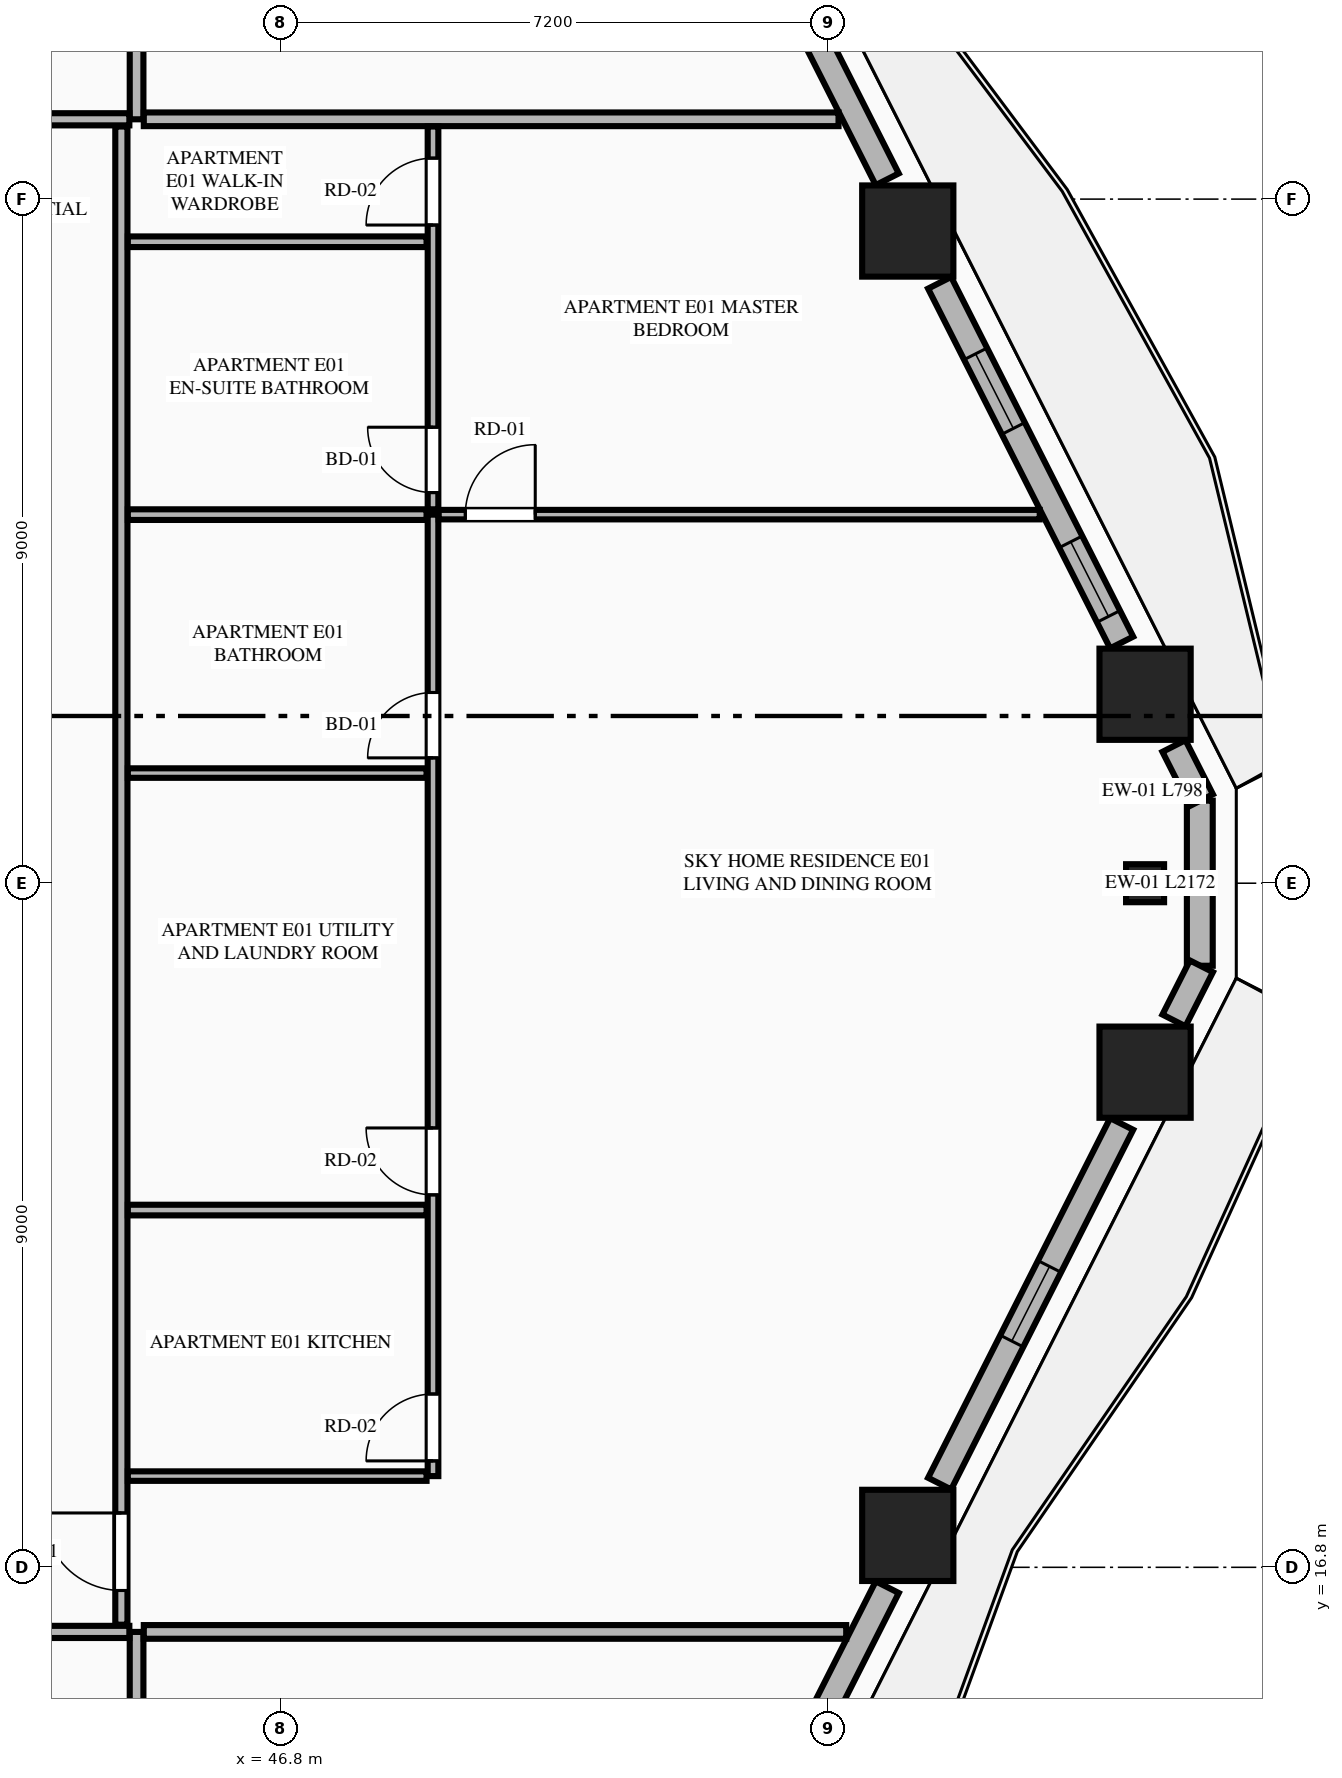
"""IFC4 building model, lengths in metres.
Left out: names, types, materials, properties, quantities, classifications, styles, units other than length and angle.
Written with IfcOpenShell. Run it as: python <this file> out.ifc"""

import sys

from ifc_helpers import new_model, si_unit, direction, frame, frame_2d, origin, origin_2d, place, context, subcontext, project, spatial, rectangle, extrude, element, fill, save


model = new_model("IFC4")
c1 = context("Model", 3, precision=1e-05, world=origin(), true_north=direction((0.0, 1.0)))
c2 = subcontext(c1, "Body", "Model", "MODEL_VIEW")
j1 = project(units=[si_unit("LENGTHUNIT", "METRE"), si_unit("PLANEANGLEUNIT", "RADIAN")], contexts=[c1])
p1 = place(None, origin())
s1 = spatial("IfcSite", under=j1, at=p1, CompositionType="ELEMENT")
p2 = place(p1, origin())
s2 = spatial("IfcBuilding", under=s1, at=p2, CompositionType="ELEMENT")
p3 = place(p2, frame((0.0, 0.0, 56.85)))
s3 = spatial("IfcBuildingStorey", under=s2, at=p3, CompositionType="ELEMENT", Elevation=56.85)
for number, where, z_axis, x_axis in (
    (1, (55.046, 17.22, 0.0), (0.0, 0.0, 1.0), (1.0, 0.0, 0.0)),
    (2, (58.168, 23.314, 0.0), (0.0, 0.0, 1.0), (1.0, 0.0, 0.0)),
    (3, (58.168, 28.286, 0.0), (0.0, 0.0, 1.0), (1.0, 0.0, 0.0)),
    (4, (55.046, 34.38, 0.0), (0.0, 0.0, 1.0), (1.0, 0.0, 0.0)),
):
    element("IfcColumn", number, at=place(p3, frame(where, z_axis=z_axis, x_axis=x_axis)), inside=s3, PredefinedType="COLUMN", context=c2, shape_type="SweptSolid", body=[
        extrude(rectangle(XDim=1.2, YDim=1.2, at=origin_2d()), origin(), (0.0, 0.0, 1.0), 3.55),
    ])
p4 = place(p3, frame((58.168, 25.8, 0.0), z_axis=(0.0, 0.0, 1.0), x_axis=(0.0, 1.0, 0.0)))
e5 = element("IfcColumn", 5, at=p4, inside=s3, PredefinedType="PILASTER", context=c2, shape_type="SweptSolid", body=[
    extrude(rectangle(XDim=0.5, YDim=0.35, at=origin_2d()), origin(), (0.0, 0.0, 1.0), 3.55),
])
p5 = place(p3, frame((58.888, 24.714, 0.0), z_axis=(0.0, 0.0, 1.0), x_axis=(0.0, 1.0, 0.0)))
e6 = element("IfcWall", 6, at=p5, inside=s3, PredefinedType="STANDARD", context=c2, shape_type="SweptSolid", body=[
    extrude(rectangle(XDim=2.172, YDim=0.34, at=frame_2d((1.086, 0.0))), origin(), (0.0, 0.0, 1.0), 3.33),
])
p6 = place(p3, frame((52.271, 11.59, 0.0), z_axis=(0.0, 0.0, 1.0), x_axis=(0.451592100298, 0.892224509273, 0.0)))
e7 = element("IfcWall", 7, at=p6, inside=s3, PredefinedType="STANDARD", context=c2, shape_type="SweptSolid", body=[
    extrude(rectangle(XDim=5.547, YDim=0.34, at=frame_2d((2.773, 0.0))), origin(), (0.0, 0.0, 1.0), 2.787),
])
p7 = place(p6, frame((1.768, 0.0, 0.0)))
e8 = element("IfcOpeningElement", 8, at=p7, cuts=e7, PredefinedType="OPENING", context=c2, shape_type="SweptSolid", body=[
    extrude(rectangle(XDim=1.1, YDim=2.25, at=frame_2d((0.55, 1.125))), frame((0.0, 0.18, 0.0), z_axis=(0.0, -1.0, 0.0), x_axis=(1.0, 0.0, 0.0)), (0.0, 0.0, 1.0), 0.36),
])
p8 = place(p3, frame((55.465, 17.901, 0.0), z_axis=(0.0, 0.0, 1.0), x_axis=(0.451572088722, 0.892234637686, 0.0)))
e9 = element("IfcWall", 9, at=p8, inside=s3, PredefinedType="STANDARD", context=c2, shape_type="SweptSolid", body=[
    extrude(rectangle(XDim=5.304, YDim=0.34, at=frame_2d((2.652, 0.0))), origin(), (0.0, 0.0, 1.0), 2.787),
])
p9 = place(p8, frame((2.102, 0.0, 0.75)))
e10 = element("IfcOpeningElement", 10, at=p9, cuts=e9, PredefinedType="OPENING", context=c2, shape_type="SweptSolid", body=[
    extrude(rectangle(XDim=1.1, YDim=1.887, at=frame_2d((0.55, 0.943))), frame((0.0, 0.18, 0.0), z_axis=(0.0, -1.0, 0.0), x_axis=(1.0, 0.0, 0.0)), (0.0, 0.0, 1.0), 0.36),
])
for number, where, z_axis, x_axis in (
    (11, (58.548, 23.995, 0.0), (0.0, 0.0, 1.0), (0.452, 0.892, 0.0)),
    (12, (58.909, 26.893, 0.0), (0.0, 0.0, 1.0), (-0.452, 0.892, 0.0)),
):
    element("IfcWall", number, at=place(p3, frame(where, z_axis=z_axis, x_axis=x_axis)), inside=s3, PredefinedType="STANDARD", context=c2, shape_type="SweptSolid", body=[
        extrude(rectangle(XDim=0.798, YDim=0.34, at=frame_2d((0.399, 0.0))), origin(), (0.0, 0.0, 1.0), 3.33),
    ])
p10 = place(p3, frame((57.86, 28.967, 0.0), z_axis=(0.0, 0.0, 1.0), x_axis=(-0.451590635984, 0.892225250422, 0.0)))
e13 = element("IfcWall", 13, at=p10, inside=s3, PredefinedType="STANDARD", context=c2, shape_type="SweptSolid", body=[
    extrude(rectangle(XDim=5.303, YDim=0.34, at=frame_2d((2.652, 0.0))), origin(), (0.0, 0.0, 1.0), 2.787),
])
p11 = place(p10, frame((0.384, 0.0, 0.75)))
e14 = element("IfcOpeningElement", 14, at=p11, cuts=e13, PredefinedType="OPENING", context=c2, shape_type="SweptSolid", body=[
    extrude(rectangle(XDim=1.1, YDim=1.887, at=frame_2d((0.55, 0.943))), frame((0.0, 0.18, 0.0), z_axis=(0.0, -1.0, 0.0), x_axis=(1.0, 0.0, 0.0)), (0.0, 0.0, 1.0), 0.36),
])
p12 = place(p10, frame((3.156, 0.0, 0.75)))
e15 = element("IfcOpeningElement", 15, at=p12, cuts=e13, PredefinedType="OPENING", context=c2, shape_type="SweptSolid", body=[
    extrude(rectangle(XDim=1.1, YDim=1.887, at=frame_2d((0.55, 0.943))), frame((0.0, 0.18, 0.0), z_axis=(0.0, -1.0, 0.0), x_axis=(1.0, 0.0, 0.0)), (0.0, 0.0, 1.0), 0.36),
])
p13 = place(p3, frame((54.776, 35.061, 0.0), z_axis=(0.0, 0.0, 1.0), x_axis=(-0.451592100298, 0.892224509273, 0.0)))
e16 = element("IfcWall", 16, at=p13, inside=s3, PredefinedType="STANDARD", context=c2, shape_type="SweptSolid", body=[
    extrude(rectangle(XDim=5.547, YDim=0.34, at=frame_2d((2.773, 0.0))), origin(), (0.0, 0.0, 1.0), 2.787),
])
p14 = place(p13, frame((2.791, 0.0, 0.0)))
e17 = element("IfcOpeningElement", 17, at=p14, cuts=e16, PredefinedType="OPENING", context=c2, shape_type="SweptSolid", body=[
    extrude(rectangle(XDim=1.1, YDim=2.25, at=frame_2d((0.55, 1.125))), frame((0.0, 0.18, 0.0), z_axis=(0.0, -1.0, 0.0), x_axis=(1.0, 0.0, 0.0)), (0.0, 0.0, 1.0), 0.36),
])
p15 = place(p3, frame((44.9, 2.455, 0.0), z_axis=(0.0, 0.0, 1.0), x_axis=(0.0, 1.0, 0.0)))
e18 = element("IfcWall", 18, at=p15, inside=s3, PredefinedType="PARTITIONING", context=c2, shape_type="SweptSolid", body=[
    extrude(rectangle(XDim=13.495, YDim=0.18, at=frame_2d((6.748, 0.0))), origin(), (0.0, 0.0, 1.0), 3.33),
])
p16 = place(p3, frame((36.617, 15.95, 0.0), z_axis=(0.0, 0.0, 1.0), x_axis=(1.0, 0.0, 0.0)))
e19 = element("IfcWall", 19, at=p16, inside=s3, PredefinedType="PARTITIONING", context=c2, shape_type="SweptSolid", body=[
    extrude(rectangle(XDim=8.188, YDim=0.16, at=frame_2d((4.094, 0.0))), origin(), (0.0, 0.0, 1.0), 3.33),
])
p17 = place(p16, frame((0.355, 0.0, 0.0)))
e20 = element("IfcOpeningElement", 20, at=p17, cuts=e19, PredefinedType="OPENING", context=c2, shape_type="SweptSolid", body=[
    extrude(rectangle(XDim=1.02, YDim=2.25, at=frame_2d((0.51, 1.125))), frame((0.0, 0.09, 0.0), z_axis=(0.0, -1.0, 0.0), x_axis=(1.0, 0.0, 0.0)), (0.0, 0.0, 1.0), 0.18),
])
p18 = place(p3, frame((44.9, 35.85, 0.0), z_axis=(0.0, 0.0, 1.0), x_axis=(0.0, 1.0, 0.0)))
e21 = element("IfcWall", 21, at=p18, inside=s3, PredefinedType="PARTITIONING", context=c2, shape_type="SweptSolid", body=[
    extrude(rectangle(XDim=13.295, YDim=0.18, at=frame_2d((6.647, 0.0))), origin(), (0.0, 0.0, 1.0), 3.33),
])
p19 = place(p3, frame((36.617, 35.85, 0.0), z_axis=(0.0, 0.0, 1.0), x_axis=(1.0, 0.0, 0.0)))
e22 = element("IfcWall", 22, at=p19, inside=s3, PredefinedType="PARTITIONING", context=c2, shape_type="SweptSolid", body=[
    extrude(rectangle(XDim=8.188, YDim=0.16, at=frame_2d((4.094, 0.0))), origin(), (0.0, 0.0, 1.0), 3.33),
])
p20 = place(p19, frame((0.355, 0.0, 0.0)))
e23 = element("IfcOpeningElement", 23, at=p20, cuts=e22, PredefinedType="OPENING", context=c2, shape_type="SweptSolid", body=[
    extrude(rectangle(XDim=1.02, YDim=2.25, at=frame_2d((0.51, 1.125))), frame((0.0, 0.09, 0.0), z_axis=(0.0, -1.0, 0.0), x_axis=(1.0, 0.0, 0.0)), (0.0, 0.0, 1.0), 0.18),
])
p21 = place(p3, frame((44.995, 15.95, 0.0), z_axis=(0.0, 0.0, 1.0), x_axis=(1.0, 0.0, 0.0)))
e24 = element("IfcWall", 24, at=p21, inside=s3, PredefinedType="PARTITIONING", context=c2, shape_type="SweptSolid", body=[
    extrude(rectangle(XDim=9.241, YDim=0.18, at=frame_2d((4.621, 0.0))), origin(), (0.0, 0.0, 1.0), 3.33),
])
p22 = place(p3, frame((44.995, 35.85, 0.0), z_axis=(0.0, 0.0, 1.0), x_axis=(1.0, 0.0, 0.0)))
e25 = element("IfcWall", 25, at=p22, inside=s3, PredefinedType="PARTITIONING", context=c2, shape_type="SweptSolid", body=[
    extrude(rectangle(XDim=9.14, YDim=0.18, at=frame_2d((4.57, 0.0))), origin(), (0.0, 0.0, 1.0), 3.33),
])
p23 = place(p3, frame((44.7, 16.045, 0.0), z_axis=(0.0, 0.0, 1.0), x_axis=(0.0, 1.0, 0.0)))
e26 = element("IfcWall", 26, at=p23, inside=s3, PredefinedType="PARTITIONING", context=c2, shape_type="SweptSolid", body=[
    extrude(rectangle(XDim=19.71, YDim=0.16, at=frame_2d((9.855, 0.0))), origin(), (0.0, 0.0, 1.0), 2.7),
])
p24 = place(p23, frame((0.45, 0.0, 0.0)))
e27 = element("IfcOpeningElement", 27, at=p24, cuts=e26, PredefinedType="OPENING", context=c2, shape_type="SweptSolid", body=[
    extrude(rectangle(XDim=1.02, YDim=2.25, at=frame_2d((0.51, 1.125))), frame((0.0, 0.09, 0.0), z_axis=(0.0, -1.0, 0.0), x_axis=(1.0, 0.0, 0.0)), (0.0, 0.0, 1.0), 0.18),
])
p25 = place(p3, frame((44.785, 18.0, 0.0), z_axis=(0.0, 0.0, 1.0), x_axis=(1.0, 0.0, 0.0)))
e28 = element("IfcWall", 28, at=p25, inside=s3, PredefinedType="PARTITIONING", context=c2, shape_type="SweptSolid", body=[
    extrude(rectangle(XDim=3.93, YDim=0.125, at=frame_2d((1.965, 0.0))), origin(), (0.0, 0.0, 1.0), 2.7),
])
p26 = place(p3, frame((48.8, 18.0, 0.0), z_axis=(0.0, 0.0, 1.0), x_axis=(0.0, 1.0, 0.0)))
e29 = element("IfcWall", 29, at=p26, inside=s3, PredefinedType="PLUMBINGWALL", context=c2, shape_type="SweptSolid", body=[
    extrude(rectangle(XDim=12.649, YDim=0.14, at=frame_2d((6.324, 0.0))), origin(), (0.0, 0.0, 1.0), 3.33),
])
p27 = place(p26, frame((0.2, 0.0, 0.0)))
e30 = element("IfcOpeningElement", 30, at=p27, cuts=e29, PredefinedType="OPENING", context=c2, shape_type="SweptSolid", body=[
    extrude(rectangle(XDim=0.88, YDim=2.15, at=frame_2d((0.44, 1.075))), frame((0.0, 0.08, 0.0), z_axis=(0.0, -1.0, 0.0), x_axis=(1.0, 0.0, 0.0)), (0.0, 0.0, 1.0), 0.16),
])
p28 = place(p26, frame((3.7, 0.0, 0.0)))
e31 = element("IfcOpeningElement", 31, at=p28, cuts=e29, PredefinedType="OPENING", context=c2, shape_type="SweptSolid", body=[
    extrude(rectangle(XDim=0.88, YDim=2.15, at=frame_2d((0.44, 1.075))), frame((0.0, 0.08, 0.0), z_axis=(0.0, -1.0, 0.0), x_axis=(1.0, 0.0, 0.0)), (0.0, 0.0, 1.0), 0.16),
])
p29 = place(p26, frame((9.449, 0.0, 0.0)))
e32 = element("IfcOpeningElement", 32, at=p29, cuts=e29, PredefinedType="OPENING", context=c2, shape_type="SweptSolid", body=[
    extrude(rectangle(XDim=0.86, YDim=2.1, at=frame_2d((0.43, 1.05))), frame((0.0, 0.08, 0.0), z_axis=(0.0, -1.0, 0.0), x_axis=(1.0, 0.0, 0.0)), (0.0, 0.0, 1.0), 0.16),
])
p30 = place(p3, frame((48.8, 30.719, 0.0), z_axis=(0.0, 0.0, 1.0), x_axis=(0.0, 1.0, 0.0)))
e33 = element("IfcWall", 33, at=p30, inside=s3, PredefinedType="PLUMBINGWALL", context=c2, shape_type="SweptSolid", body=[
    extrude(rectangle(XDim=5.036, YDim=0.14, at=frame_2d((2.518, 0.0))), origin(), (0.0, 0.0, 1.0), 3.33),
])
p31 = place(p30, frame((0.22, 0.0, 0.0)))
e34 = element("IfcOpeningElement", 34, at=p31, cuts=e33, PredefinedType="OPENING", context=c2, shape_type="SweptSolid", body=[
    extrude(rectangle(XDim=0.86, YDim=2.1, at=frame_2d((0.43, 1.05))), frame((0.0, 0.08, 0.0), z_axis=(0.0, -1.0, 0.0), x_axis=(1.0, 0.0, 0.0)), (0.0, 0.0, 1.0), 0.16),
])
p32 = place(p30, frame((3.74, 0.0, 0.0)))
e35 = element("IfcOpeningElement", 35, at=p32, cuts=e33, PredefinedType="OPENING", context=c2, shape_type="SweptSolid", body=[
    extrude(rectangle(XDim=0.88, YDim=2.15, at=frame_2d((0.44, 1.075))), frame((0.0, 0.08, 0.0), z_axis=(0.0, -1.0, 0.0), x_axis=(1.0, 0.0, 0.0)), (0.0, 0.0, 1.0), 0.16),
])
p33 = place(p3, frame((44.785, 30.649, 0.0), z_axis=(0.0, 0.0, 1.0), x_axis=(1.0, 0.0, 0.0)))
e36 = element("IfcWall", 36, at=p33, inside=s3, PredefinedType="PLUMBINGWALL", context=c2, shape_type="SweptSolid", body=[
    extrude(rectangle(XDim=3.93, YDim=0.14, at=frame_2d((1.965, 0.0))), origin(), (0.0, 0.0, 1.0), 3.33),
])
p34 = place(p3, frame((48.875, 30.649, 0.0), z_axis=(0.0, 0.0, 1.0), x_axis=(1.0, 0.0, 0.0)))
e37 = element("IfcWall", 37, at=p34, inside=s3, PredefinedType="PARTITIONING", context=c2, shape_type="SweptSolid", body=[
    extrude(rectangle(XDim=7.907, YDim=0.125, at=frame_2d((3.954, 0.0))), origin(), (0.0, 0.0, 1.0), 3.33),
])
p35 = place(p34, frame((0.35, 0.0, 0.0)))
e38 = element("IfcOpeningElement", 38, at=p35, cuts=e37, PredefinedType="OPENING", context=c2, shape_type="SweptSolid", body=[
    extrude(rectangle(XDim=0.92, YDim=2.15, at=frame_2d((0.46, 1.075))), frame((0.0, 0.073, 0.0), z_axis=(0.0, -1.0, 0.0), x_axis=(1.0, 0.0, 0.0)), (0.0, 0.0, 1.0), 0.145),
])
p36 = place(p3, frame((44.785, 21.5, 0.0), z_axis=(0.0, 0.0, 1.0), x_axis=(1.0, 0.0, 0.0)))
e39 = element("IfcWall", 39, at=p36, inside=s3, PredefinedType="PLUMBINGWALL", context=c2, shape_type="SweptSolid", body=[
    extrude(rectangle(XDim=3.93, YDim=0.14, at=frame_2d((1.965, 0.0))), origin(), (0.0, 0.0, 1.0), 3.33),
])
p37 = place(p3, frame((44.785, 27.249, 0.0), z_axis=(0.0, 0.0, 1.0), x_axis=(1.0, 0.0, 0.0)))
e40 = element("IfcWall", 40, at=p37, inside=s3, PredefinedType="PARTITIONING", context=c2, shape_type="SweptSolid", body=[
    extrude(rectangle(XDim=3.93, YDim=0.125, at=frame_2d((1.965, 0.0))), origin(), (0.0, 0.0, 1.0), 3.33),
])
p38 = place(p3, frame((44.785, 34.239, 0.0), z_axis=(0.0, 0.0, 1.0), x_axis=(1.0, 0.0, 0.0)))
e41 = element("IfcWall", 41, at=p38, inside=s3, PredefinedType="PLUMBINGWALL", context=c2, shape_type="SweptSolid", body=[
    extrude(rectangle(XDim=3.93, YDim=0.14, at=frame_2d((1.965, 0.0))), origin(), (0.0, 0.0, 1.0), 2.7),
])
p39 = place(p9, origin())
e42 = element("IfcWindow", 42, at=p39, inside=s3, PartitioningType="SINGLE_PANEL", PredefinedType="WINDOW", context=c2, shape_type="SweptSolid", body=[
    extrude(rectangle(XDim=1.1, YDim=1.887, at=frame_2d((0.55, 0.943))), frame((0.0, 0.03, 0.0), z_axis=(0.0, -1.0, 0.0), x_axis=(1.0, 0.0, 0.0)), (0.0, 0.0, 1.0), 0.06),
])
fill(e10, e42)
p40 = place(p11, origin())
e43 = element("IfcWindow", 43, at=p40, inside=s3, PartitioningType="SINGLE_PANEL", PredefinedType="WINDOW", context=c2, shape_type="SweptSolid", body=[
    extrude(rectangle(XDim=1.1, YDim=1.887, at=frame_2d((0.55, 0.943))), frame((0.0, 0.03, 0.0), z_axis=(0.0, -1.0, 0.0), x_axis=(1.0, 0.0, 0.0)), (0.0, 0.0, 1.0), 0.06),
])
fill(e14, e43)
p41 = place(p27, origin())
e44 = element("IfcDoor", 44, at=p41, inside=s3, OperationType="SINGLE_SWING_LEFT", PredefinedType="DOOR", context=c2, shape_type="SweptSolid", body=[
    extrude(rectangle(XDim=0.88, YDim=2.15, at=frame_2d((0.44, 1.075))), frame((0.0, 0.025, 0.0), z_axis=(0.0, -1.0, 0.0), x_axis=(1.0, 0.0, 0.0)), (0.0, 0.0, 1.0), 0.05),
])
fill(e30, e44)
p42 = place(p28, origin())
e45 = element("IfcDoor", 45, at=p42, inside=s3, OperationType="SINGLE_SWING_RIGHT", PredefinedType="DOOR", context=c2, shape_type="SweptSolid", body=[
    extrude(rectangle(XDim=0.88, YDim=2.15, at=frame_2d((0.44, 1.075))), frame((0.0, 0.025, 0.0), z_axis=(0.0, -1.0, 0.0), x_axis=(1.0, 0.0, 0.0)), (0.0, 0.0, 1.0), 0.05),
])
fill(e31, e45)
p43 = place(p29, origin())
e46 = element("IfcDoor", 46, at=p43, inside=s3, OperationType="SINGLE_SWING_LEFT", PredefinedType="DOOR", context=c2, shape_type="SweptSolid", body=[
    extrude(rectangle(XDim=0.86, YDim=2.1, at=frame_2d((0.43, 1.05))), frame((0.0, 0.025, 0.0), z_axis=(0.0, -1.0, 0.0), x_axis=(1.0, 0.0, 0.0)), (0.0, 0.0, 1.0), 0.05),
])
fill(e32, e46)
p44 = place(p31, origin())
e47 = element("IfcDoor", 47, at=p44, inside=s3, OperationType="SINGLE_SWING_RIGHT", PredefinedType="DOOR", context=c2, shape_type="SweptSolid", body=[
    extrude(rectangle(XDim=0.86, YDim=2.1, at=frame_2d((0.43, 1.05))), frame((0.0, 0.025, 0.0), z_axis=(0.0, -1.0, 0.0), x_axis=(1.0, 0.0, 0.0)), (0.0, 0.0, 1.0), 0.05),
])
fill(e34, e47)
p45 = place(p32, origin())
e48 = element("IfcDoor", 48, at=p45, inside=s3, OperationType="SINGLE_SWING_LEFT", PredefinedType="DOOR", context=c2, shape_type="SweptSolid", body=[
    extrude(rectangle(XDim=0.88, YDim=2.15, at=frame_2d((0.44, 1.075))), frame((0.0, 0.025, 0.0), z_axis=(0.0, -1.0, 0.0), x_axis=(1.0, 0.0, 0.0)), (0.0, 0.0, 1.0), 0.05),
])
fill(e35, e48)
p46 = place(p24, origin())
e49 = element("IfcDoor", 49, at=p46, inside=s3, OperationType="SINGLE_SWING_RIGHT", PredefinedType="DOOR", context=c2, shape_type="SweptSolid", body=[
    extrude(rectangle(XDim=1.02, YDim=2.25, at=frame_2d((0.51, 1.125))), frame((0.0, 0.025, 0.0), z_axis=(0.0, -1.0, 0.0), x_axis=(1.0, 0.0, 0.0)), (0.0, 0.0, 1.0), 0.05),
])
fill(e27, e49)
p47 = place(p35, origin())
e50 = element("IfcDoor", 50, at=p47, inside=s3, OperationType="SINGLE_SWING_RIGHT", PredefinedType="DOOR", context=c2, shape_type="SweptSolid", body=[
    extrude(rectangle(XDim=0.92, YDim=2.15, at=frame_2d((0.46, 1.075))), frame((0.0, 0.025, 0.0), z_axis=(0.0, -1.0, 0.0), x_axis=(1.0, 0.0, 0.0)), (0.0, 0.0, 1.0), 0.05),
])
fill(e38, e50)
p48 = place(p12, origin())
e51 = element("IfcWindow", 51, at=p48, inside=s3, PartitioningType="SINGLE_PANEL", PredefinedType="WINDOW", context=c2, shape_type="SweptSolid", body=[
    extrude(rectangle(XDim=1.1, YDim=1.887, at=frame_2d((0.55, 0.943))), frame((0.0, 0.03, 0.0), z_axis=(0.0, -1.0, 0.0), x_axis=(1.0, 0.0, 0.0)), (0.0, 0.0, 1.0), 0.06),
])
fill(e15, e51)
save(model, sys.argv[1])
